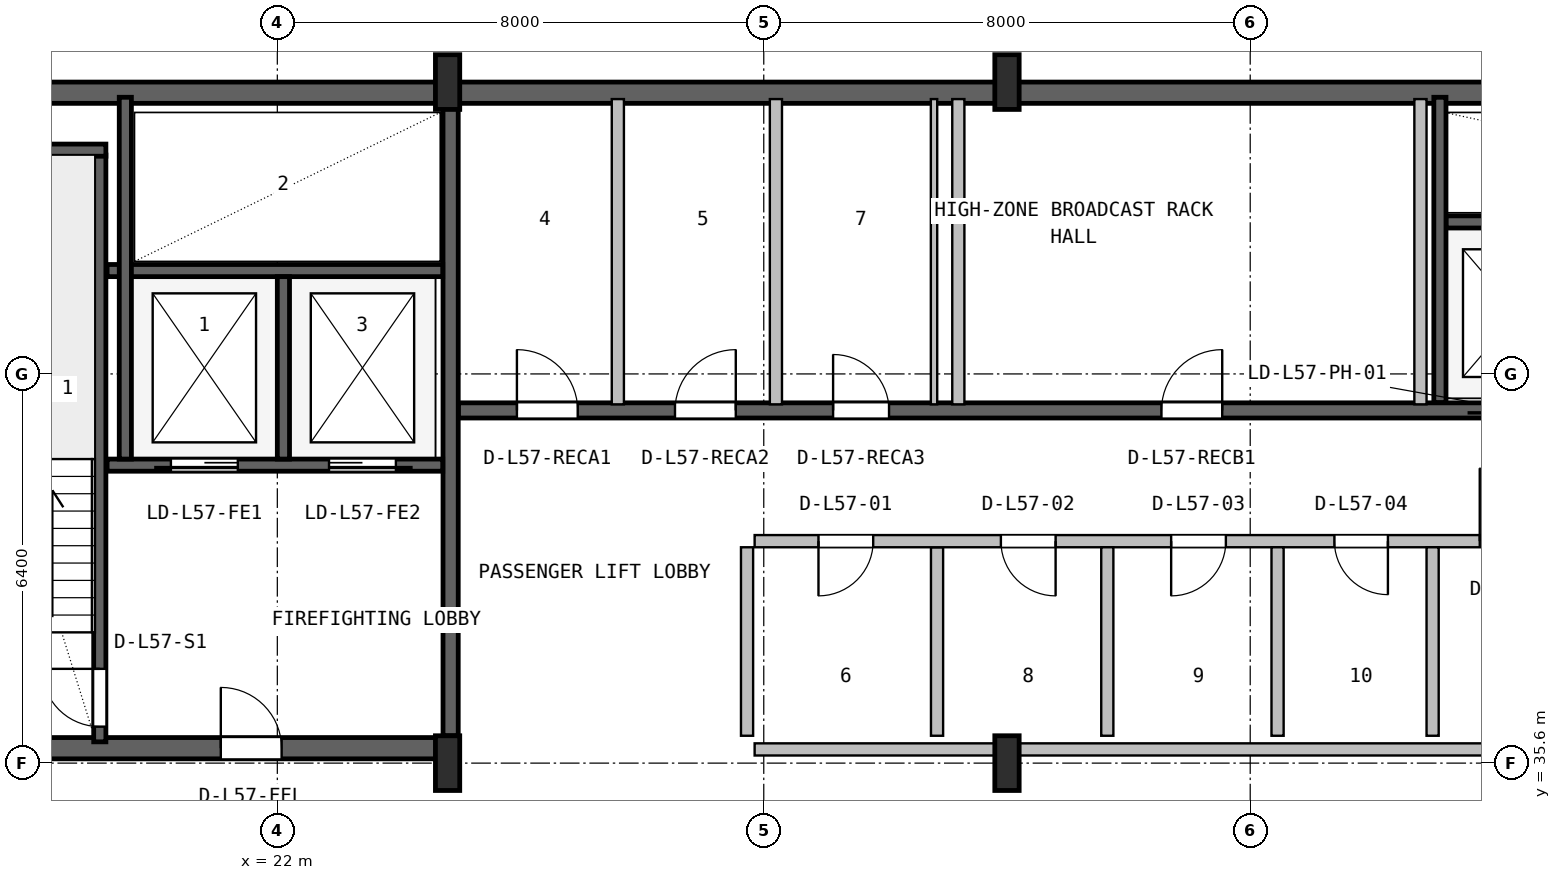
"""IFC4 building model, lengths in metres.
Left out: names, types, materials, properties, quantities, classifications, styles, units other than length and angle.
Written with IfcOpenShell. Run it as: python <this file> out.ifc"""

import sys

from ifc_helpers import new_model, si_unit, direction, frame, frame_2d, origin, origin_2d, place, context, subcontext, project, spatial, rectangle, i_section, extrude, source, transform, mapped, element, fill, save


model = new_model("IFC4")
c1 = context("Model", 3, precision=1e-05, world=origin(), true_north=direction((0.0, 1.0)))
c2 = subcontext(c1, "Body", "Model", "MODEL_VIEW")
j1 = project(units=[si_unit("LENGTHUNIT", "METRE"), si_unit("PLANEANGLEUNIT", "RADIAN")], contexts=[c1])
p1 = place(None, origin())
s1 = spatial("IfcSite", under=j1, at=p1, CompositionType="ELEMENT")
p2 = place(p1, origin())
s2 = spatial("IfcBuilding", under=s1, at=p2, CompositionType="ELEMENT")
p3 = place(p2, frame((0.0, 0.0, 230.2)))
s3 = spatial("IfcBuildingStorey", under=s2, at=p3, CompositionType="ELEMENT", Elevation=230.2)
p4 = place(p3, frame((15.6, 46.625, 0.0), z_axis=(0.0, 0.0, 1.0), x_axis=(1.0, 0.0, 0.0)))
e1 = element("IfcWall", 1, at=p4, inside=s3, PredefinedType="SHEAR", context=c2, shape_type="SweptSolid", body=[
    extrude(rectangle(XDim=36.8, YDim=0.35, at=frame_2d((18.4, 0.0))), origin(), (0.0, 0.0, 1.0), 3.48),
])
p5 = place(p3, frame((15.67, 35.845, 0.0), z_axis=(0.0, 0.0, 1.0), x_axis=(1.0, 0.0, 0.0)))
e2 = element("IfcWall", 2, at=p5, inside=s3, PredefinedType="SHEAR", context=c2, shape_type="SweptSolid", body=[
    extrude(rectangle(XDim=9.13, YDim=0.35, at=frame_2d((4.565, 0.0))), origin(), (0.0, 0.0, 1.0), 3.48),
])
p6 = place(p5, frame((5.4, 0.0, 0.0)))
e3 = element("IfcOpeningElement", 3, at=p6, cuts=e2, PredefinedType="OPENING", context=c2, shape_type="SweptSolid", body=[
    extrude(rectangle(XDim=1.0, YDim=2.1, at=frame_2d((0.5, 1.05))), frame((0.0, 0.185, 0.0), z_axis=(0.0, -1.0, 0.0), x_axis=(1.0, 0.0, 0.0)), (0.0, 0.0, 1.0), 0.37),
])
m1 = source(origin(), c2, "Body", "SweptSolid", [
    extrude(i_section(OverallWidth=0.4, OverallDepth=0.9, WebThickness=0.016, FlangeThickness=0.028, FilletRadius=0.016, at=origin_2d()), origin(), (0.0, 0.0, 1.0), 3.8),
])
for number, where, z_axis, x_axis in (
    (4, (24.8, 35.6, 0.0), (0.0, 0.0, 1.0), (1.0, 0.0, 0.0)),
    (5, (24.8, 46.8, 0.0), (0.0, 0.0, 1.0), (1.0, 0.0, 0.0)),
    (6, (34.0, 35.6, 0.0), (0.0, 0.0, 1.0), (1.0, 0.0, 0.0)),
    (7, (34.0, 46.8, 0.0), (0.0, 0.0, 1.0), (1.0, 0.0, 0.0)),
):
    element("IfcColumn", number, at=place(p3, frame(where, z_axis=z_axis, x_axis=x_axis)), inside=s3, PredefinedType="COLUMN", context=c2, shape_type="MappedRepresentation", body=[
        mapped(m1, transform((0.0, 0.0, 0.0), x_axis=(1.0, 0.0, 0.0), y_axis=(0.0, 1.0, 0.0), z_axis=(0.0, 0.0, 1.0), scale=1.0)),
    ])
p7 = place(p3, frame((19.08, 35.95, 0.0), z_axis=(0.0, 0.0, 1.0), x_axis=(0.0, 1.0, 0.0)))
e8 = element("IfcWall", 8, at=p7, inside=s3, PredefinedType="SHEAR", context=c2, shape_type="SweptSolid", body=[
    extrude(rectangle(XDim=9.65, YDim=0.2, at=frame_2d((4.825, 0.0))), origin(), (0.0, 0.0, 1.0), 3.48),
])
p8 = place(p7, frame((0.25, 0.0, 0.0)))
e9 = element("IfcOpeningElement", 9, at=p8, cuts=e8, PredefinedType="OPENING", context=c2, shape_type="SweptSolid", body=[
    extrude(rectangle(XDim=0.95, YDim=2.1, at=frame_2d((0.475, 1.05))), frame((0.0, 0.11, 0.0), z_axis=(0.0, -1.0, 0.0), x_axis=(1.0, 0.0, 0.0)), (0.0, 0.0, 1.0), 0.22),
])
p9 = place(p3, frame((15.95, 45.68, 0.0), z_axis=(0.0, 0.0, 1.0), x_axis=(1.0, 0.0, 0.0)))
e10 = element("IfcWall", 10, at=p9, inside=s3, PredefinedType="SHEAR", context=c2, shape_type="SweptSolid", body=[
    extrude(rectangle(XDim=3.23, YDim=0.2, at=frame_2d((1.615, 0.0))), origin(), (0.0, 0.0, 1.0), 3.48),
])
p10 = place(p3, frame((24.85, 36.05, 0.0), z_axis=(0.0, 0.0, 1.0), x_axis=(0.0, 1.0, 0.0)))
e11 = element("IfcWall", 11, at=p10, inside=s3, PredefinedType="SHEAR", context=c2, shape_type="SweptSolid", body=[
    extrude(rectangle(XDim=10.45, YDim=0.25, at=frame_2d((5.225, 0.0))), origin(), (0.0, 0.0, 1.0), 3.48),
])
p11 = place(p3, frame((19.2, 40.5, 0.0), z_axis=(0.0, 0.0, 1.0), x_axis=(1.0, 0.0, 0.0)))
e12 = element("IfcWall", 12, at=p11, inside=s3, PredefinedType="SHEAR", context=c2, shape_type="SweptSolid", body=[
    extrude(rectangle(XDim=5.52, YDim=0.2, at=frame_2d((2.76, 0.0))), origin(), (0.0, 0.0, 1.0), 3.48),
])
p12 = place(p11, frame((1.05, 0.0, 0.0)))
e13 = element("IfcOpeningElement", 13, at=p12, cuts=e12, PredefinedType="OPENING", context=c2, shape_type="SweptSolid", body=[
    extrude(rectangle(XDim=1.1, YDim=2.18, at=frame_2d((0.55, 1.09))), frame((0.0, 0.11, 0.0), z_axis=(0.0, -1.0, 0.0), x_axis=(1.0, 0.0, 0.0)), (0.0, 0.0, 1.0), 0.22),
])
p13 = place(p11, frame((3.65, 0.0, 0.0)))
e14 = element("IfcOpeningElement", 14, at=p13, cuts=e12, PredefinedType="OPENING", context=c2, shape_type="SweptSolid", body=[
    extrude(rectangle(XDim=1.1, YDim=2.18, at=frame_2d((0.55, 1.09))), frame((0.0, 0.11, 0.0), z_axis=(0.0, -1.0, 0.0), x_axis=(1.0, 0.0, 0.0)), (0.0, 0.0, 1.0), 0.22),
])
p14 = place(p3, frame((19.2, 43.7, 0.0), z_axis=(0.0, 0.0, 1.0), x_axis=(1.0, 0.0, 0.0)))
e15 = element("IfcWall", 15, at=p14, inside=s3, PredefinedType="SHEAR", context=c2, shape_type="SweptSolid", body=[
    extrude(rectangle(XDim=5.52, YDim=0.2, at=frame_2d((2.76, 0.0))), origin(), (0.0, 0.0, 1.0), 3.48),
])
p15 = place(p3, frame((22.1, 40.6, 0.0), z_axis=(0.0, 0.0, 1.0), x_axis=(0.0, 1.0, 0.0)))
e16 = element("IfcWall", 16, at=p15, inside=s3, PredefinedType="SHEAR", context=c2, shape_type="SweptSolid", body=[
    extrude(rectangle(XDim=3.0, YDim=0.2, at=frame_2d((1.5, 0.0))), origin(), (0.0, 0.0, 1.0), 3.48),
])
p16 = place(p3, frame((19.5, 40.6, 0.0), z_axis=(0.0, 0.0, 1.0), x_axis=(0.0, 1.0, 0.0)))
e17 = element("IfcWall", 17, at=p16, inside=s3, PredefinedType="SHEAR", context=c2, shape_type="SweptSolid", body=[
    extrude(rectangle(XDim=5.95, YDim=0.2, at=frame_2d((2.975, 0.0))), origin(), (0.0, 0.0, 1.0), 3.48),
])
p17 = place(p3, frame((24.98, 41.4, 0.0), z_axis=(0.0, 0.0, 1.0), x_axis=(1.0, 0.0, 0.0)))
e18 = element("IfcWall", 18, at=p17, inside=s3, PredefinedType="SHEAR", context=c2, shape_type="SweptSolid", body=[
    extrude(rectangle(XDim=23.82, YDim=0.25, at=frame_2d((11.91, 0.0))), origin(), (0.0, 0.0, 1.0), 3.48),
])
p18 = place(p17, frame((16.87, 0.0, 0.0)))
e19 = element("IfcOpeningElement", 19, at=p18, cuts=e18, PredefinedType="OPENING", context=c2, shape_type="SweptSolid", body=[
    extrude(rectangle(XDim=1.1, YDim=2.18, at=frame_2d((0.55, 1.09))), frame((0.0, 0.135, 0.0), z_axis=(0.0, -1.0, 0.0), x_axis=(1.0, 0.0, 0.0)), (0.0, 0.0, 1.0), 0.27),
])
p19 = place(p17, frame((19.47, 0.0, 0.0)))
e20 = element("IfcOpeningElement", 20, at=p19, cuts=e18, PredefinedType="OPENING", context=c2, shape_type="SweptSolid", body=[
    extrude(rectangle(XDim=1.1, YDim=2.18, at=frame_2d((0.55, 1.09))), frame((0.0, 0.135, 0.0), z_axis=(0.0, -1.0, 0.0), x_axis=(1.0, 0.0, 0.0)), (0.0, 0.0, 1.0), 0.27),
])
p20 = place(p17, frame((22.07, 0.0, 0.0)))
e21 = element("IfcOpeningElement", 21, at=p20, cuts=e18, PredefinedType="OPENING", context=c2, shape_type="SweptSolid", body=[
    extrude(rectangle(XDim=1.1, YDim=2.18, at=frame_2d((0.55, 1.09))), frame((0.0, 0.135, 0.0), z_axis=(0.0, -1.0, 0.0), x_axis=(1.0, 0.0, 0.0)), (0.0, 0.0, 1.0), 0.27),
])
p21 = place(p17, frame((0.96, 0.0, 0.0)))
e22 = element("IfcOpeningElement", 22, at=p21, cuts=e18, PredefinedType="OPENING", context=c2, shape_type="SweptSolid", body=[
    extrude(rectangle(XDim=1.0, YDim=2.08, at=frame_2d((0.5, 1.04))), frame((0.0, 0.135, 0.0), z_axis=(0.0, -1.0, 0.0), x_axis=(1.0, 0.0, 0.0)), (0.0, 0.0, 1.0), 0.27),
])
p22 = place(p17, frame((3.56, 0.0, 0.0)))
e23 = element("IfcOpeningElement", 23, at=p22, cuts=e18, PredefinedType="OPENING", context=c2, shape_type="SweptSolid", body=[
    extrude(rectangle(XDim=1.0, YDim=2.08, at=frame_2d((0.5, 1.04))), frame((0.0, 0.135, 0.0), z_axis=(0.0, -1.0, 0.0), x_axis=(1.0, 0.0, 0.0)), (0.0, 0.0, 1.0), 0.27),
])
p23 = place(p17, frame((6.16, 0.0, 0.0)))
e24 = element("IfcOpeningElement", 24, at=p23, cuts=e18, PredefinedType="OPENING", context=c2, shape_type="SweptSolid", body=[
    extrude(rectangle(XDim=0.92, YDim=2.08, at=frame_2d((0.46, 1.04))), frame((0.0, 0.135, 0.0), z_axis=(0.0, -1.0, 0.0), x_axis=(1.0, 0.0, 0.0)), (0.0, 0.0, 1.0), 0.27),
])
p24 = place(p17, frame((11.56, 0.0, 0.0)))
e25 = element("IfcOpeningElement", 25, at=p24, cuts=e18, PredefinedType="OPENING", context=c2, shape_type="SweptSolid", body=[
    extrude(rectangle(XDim=1.0, YDim=2.08, at=frame_2d((0.5, 1.04))), frame((0.0, 0.135, 0.0), z_axis=(0.0, -1.0, 0.0), x_axis=(1.0, 0.0, 0.0)), (0.0, 0.0, 1.0), 0.27),
])
p25 = place(p3, frame((41.22, 44.5, 0.0), z_axis=(0.0, 0.0, 1.0), x_axis=(1.0, 0.0, 0.0)))
e26 = element("IfcWall", 26, at=p25, inside=s3, PredefinedType="SHEAR", context=c2, shape_type="SweptSolid", body=[
    extrude(rectangle(XDim=7.58, YDim=0.2, at=frame_2d((3.79, 0.0))), origin(), (0.0, 0.0, 1.0), 3.48),
])
p26 = place(p3, frame((41.12, 41.53, 0.0), z_axis=(0.0, 0.0, 1.0), x_axis=(0.0, 1.0, 0.0)))
e27 = element("IfcWall", 27, at=p26, inside=s3, PredefinedType="SHEAR", context=c2, shape_type="SweptSolid", body=[
    extrude(rectangle(XDim=5.02, YDim=0.2, at=frame_2d((2.51, 0.0))), origin(), (0.0, 0.0, 1.0), 3.48),
])
p27 = place(p3, frame((29.85, 35.825, 0.0), z_axis=(0.0, 0.0, 1.0), x_axis=(1.0, 0.0, 0.0)))
e28 = element("IfcWall", 28, at=p27, inside=s3, PredefinedType="SOLIDWALL", context=c2, shape_type="SweptSolid", body=[
    extrude(rectangle(XDim=13.7, YDim=0.2, at=frame_2d((6.85, 0.0))), origin(), (0.0, 0.0, 1.0), 2.505),
])
p28 = place(p3, frame((32.85, 36.05, 0.0), z_axis=(0.0, 0.0, 1.0), x_axis=(0.0, 1.0, 0.0)))
e29 = element("IfcWall", 29, at=p28, inside=s3, PredefinedType="PLUMBINGWALL", context=c2, shape_type="SweptSolid", body=[
    extrude(rectangle(XDim=3.1, YDim=0.2, at=frame_2d((1.55, 0.0))), origin(), (0.0, 0.0, 1.0), 3.46),
])
p29 = place(p3, frame((29.85, 39.25, 0.0), z_axis=(0.0, 0.0, 1.0), x_axis=(1.0, 0.0, 0.0)))
e30 = element("IfcWall", 30, at=p29, inside=s3, PredefinedType="SOLIDWALL", context=c2, shape_type="SweptSolid", body=[
    extrude(rectangle(XDim=13.7, YDim=0.2, at=frame_2d((6.85, 0.0))), origin(), (0.0, 0.0, 1.0), 3.46),
])
p30 = place(p29, frame((1.05, 0.0, 0.0)))
e31 = element("IfcOpeningElement", 31, at=p30, cuts=e30, PredefinedType="OPENING", context=c2, shape_type="SweptSolid", body=[
    extrude(rectangle(XDim=0.9, YDim=2.06, at=frame_2d((0.45, 1.03))), frame((0.0, 0.11, 0.0), z_axis=(0.0, -1.0, 0.0), x_axis=(1.0, 0.0, 0.0)), (0.0, 0.0, 1.0), 0.22),
])
p31 = place(p29, frame((4.05, 0.0, 0.0)))
e32 = element("IfcOpeningElement", 32, at=p31, cuts=e30, PredefinedType="OPENING", context=c2, shape_type="SweptSolid", body=[
    extrude(rectangle(XDim=0.9, YDim=2.06, at=frame_2d((0.45, 1.03))), frame((0.0, 0.11, 0.0), z_axis=(0.0, -1.0, 0.0), x_axis=(1.0, 0.0, 0.0)), (0.0, 0.0, 1.0), 0.22),
])
p32 = place(p29, frame((6.85, 0.0, 0.0)))
e33 = element("IfcOpeningElement", 33, at=p32, cuts=e30, PredefinedType="OPENING", context=c2, shape_type="SweptSolid", body=[
    extrude(rectangle(XDim=0.9, YDim=2.06, at=frame_2d((0.45, 1.03))), frame((0.0, 0.11, 0.0), z_axis=(0.0, -1.0, 0.0), x_axis=(1.0, 0.0, 0.0)), (0.0, 0.0, 1.0), 0.22),
])
p33 = place(p29, frame((9.535, 0.0, 0.0)))
e34 = element("IfcOpeningElement", 34, at=p33, cuts=e30, PredefinedType="OPENING", context=c2, shape_type="SweptSolid", body=[
    extrude(rectangle(XDim=0.88, YDim=2.06, at=frame_2d((0.44, 1.03))), frame((0.0, 0.11, 0.0), z_axis=(0.0, -1.0, 0.0), x_axis=(1.0, 0.0, 0.0)), (0.0, 0.0, 1.0), 0.22),
])
p34 = place(p29, frame((11.925, 0.0, 0.0)))
e35 = element("IfcOpeningElement", 35, at=p34, cuts=e30, PredefinedType="OPENING", context=c2, shape_type="SweptSolid", body=[
    extrude(rectangle(XDim=1.2, YDim=2.1, at=frame_2d((0.6, 1.05))), frame((0.0, 0.11, 0.0), z_axis=(0.0, -1.0, 0.0), x_axis=(1.0, 0.0, 0.0)), (0.0, 0.0, 1.0), 0.22),
])
for number, where, z_axis, x_axis in (
    (36, (29.725, 36.05, 0.0), (0.0, 0.0, 1.0), (0.0, 1.0, 0.0)),
    (37, (35.65, 36.05, 0.0), (0.0, 0.0, 1.0), (0.0, 1.0, 0.0)),
    (38, (38.45, 36.05, 0.0), (0.0, 0.0, 1.0), (0.0, 1.0, 0.0)),
):
    element("IfcWall", number, at=place(p3, frame(where, z_axis=z_axis, x_axis=x_axis)), inside=s3, PredefinedType="PLUMBINGWALL", context=c2, shape_type="SweptSolid", body=[
        extrude(rectangle(XDim=3.1, YDim=0.2, at=frame_2d((1.55, 0.0))), origin(), (0.0, 0.0, 1.0), 3.46),
    ])
p35 = place(p3, frame((41.0, 36.05, 0.0), z_axis=(0.0, 0.0, 1.0), x_axis=(0.0, 1.0, 0.0)))
e39 = element("IfcWall", 39, at=p35, inside=s3, PredefinedType="SOLIDWALL", context=c2, shape_type="SweptSolid", body=[
    extrude(rectangle(XDim=3.1, YDim=0.2, at=frame_2d((1.55, 0.0))), origin(), (0.0, 0.0, 1.0), 3.46),
])
for number, where, z_axis, x_axis in (
    (40, (27.6, 41.5, 0.0), (0.0, 0.0, 1.0), (0.0, 1.0, 0.0)),
    (41, (30.2, 41.5, 0.0), (0.0, 0.0, 1.0), (0.0, 1.0, 0.0)),
):
    element("IfcWall", number, at=place(p3, frame(where, z_axis=z_axis, x_axis=x_axis)), inside=s3, PredefinedType="SOLIDWALL", context=c2, shape_type="SweptSolid", body=[
        extrude(rectangle(XDim=5.02, YDim=0.2, at=frame_2d((2.51, 0.0))), origin(), (0.0, 0.0, 1.0), 3.46),
    ])
p36 = place(p3, frame((32.8, 41.5, 0.0), z_axis=(0.0, 0.0, 1.0), x_axis=(0.0, 1.0, 0.0)))
e42 = element("IfcWall", 42, at=p36, inside=s3, PredefinedType="PARTITIONING", context=c2, shape_type="SweptSolid", body=[
    extrude(rectangle(XDim=5.02, YDim=0.105, at=frame_2d((2.51, 0.0))), origin(), (0.0, 0.0, 1.0), 3.46),
])
for number, where, z_axis, x_axis in (
    (43, (40.8, 41.5, 0.0), (0.0, 0.0, 1.0), (0.0, 1.0, 0.0)),
    (44, (33.2, 41.5, 0.0), (0.0, 0.0, 1.0), (0.0, 1.0, 0.0)),
):
    element("IfcWall", number, at=place(p3, frame(where, z_axis=z_axis, x_axis=x_axis)), inside=s3, PredefinedType="SOLIDWALL", context=c2, shape_type="SweptSolid", body=[
        extrude(rectangle(XDim=5.02, YDim=0.2, at=frame_2d((2.51, 0.0))), origin(), (0.0, 0.0, 1.0), 3.46),
    ])
m2 = source(origin(), c2, "Body", "SweptSolid", [
    extrude(rectangle(XDim=0.95, YDim=2.1, at=frame_2d((0.475, 1.05))), frame((0.0, 0.025, 0.0), z_axis=(0.0, -1.0, 0.0), x_axis=(1.0, 0.0, 0.0)), (0.0, 0.0, 1.0), 0.05),
])
p37 = place(p8, origin())
e45 = element("IfcDoor", 45, at=p37, inside=s3, OperationType="SINGLE_SWING_RIGHT", PredefinedType="DOOR", context=c2, shape_type="MappedRepresentation", body=[
    mapped(m2, transform((0.0, 0.0, 0.0), x_axis=(1.0, 0.0, 0.0), y_axis=(0.0, 1.0, 0.0), z_axis=(0.0, 0.0, 1.0), scale=1.0)),
])
fill(e9, e45)
m3 = source(origin(), c2, "Body", "SweptSolid", [
    extrude(rectangle(XDim=1.0, YDim=2.1, at=frame_2d((0.5, 1.05))), frame((0.0, 0.025, 0.0), z_axis=(0.0, -1.0, 0.0), x_axis=(1.0, 0.0, 0.0)), (0.0, 0.0, 1.0), 0.05),
])
p38 = place(p6, origin())
e46 = element("IfcDoor", 46, at=p38, inside=s3, OperationType="SINGLE_SWING_LEFT", PredefinedType="DOOR", context=c2, shape_type="MappedRepresentation", body=[
    mapped(m3, transform((0.0, 0.0, 0.0), x_axis=(1.0, 0.0, 0.0), y_axis=(0.0, 1.0, 0.0), z_axis=(0.0, 0.0, 1.0), scale=1.0)),
])
fill(e3, e46)
m4 = source(origin(), c2, "Body", "SweptSolid", [
    extrude(rectangle(XDim=1.1, YDim=2.18, at=frame_2d((0.55, 1.09))), frame((0.0, 0.025, 0.0), z_axis=(0.0, -1.0, 0.0), x_axis=(1.0, 0.0, 0.0)), (0.0, 0.0, 1.0), 0.05),
])
p39 = place(p12, frame((1.1, 0.0, 0.0), z_axis=(0.0, 0.0, 1.0), x_axis=(-1.0, 0.0, 0.0)))
e47 = element("IfcDoor", 47, at=p39, inside=s3, OperationType="SLIDING_TO_LEFT", PredefinedType="DOOR", context=c2, shape_type="MappedRepresentation", body=[
    mapped(m4, transform((0.0, 0.0, 0.0), x_axis=(1.0, 0.0, 0.0), y_axis=(0.0, 1.0, 0.0), z_axis=(0.0, 0.0, 1.0), scale=1.0)),
])
fill(e13, e47)
p40 = place(p13, frame((1.1, 0.0, 0.0), z_axis=(0.0, 0.0, 1.0), x_axis=(-1.0, 0.0, 0.0)))
e48 = element("IfcDoor", 48, at=p40, inside=s3, OperationType="SLIDING_TO_RIGHT", PredefinedType="DOOR", context=c2, shape_type="MappedRepresentation", body=[
    mapped(m4, transform((0.0, 0.0, 0.0), x_axis=(1.0, 0.0, 0.0), y_axis=(0.0, 1.0, 0.0), z_axis=(0.0, 0.0, 1.0), scale=1.0)),
])
fill(e14, e48)
m5 = source(origin(), c2, "Body", "SweptSolid", [
    extrude(rectangle(XDim=1.0, YDim=2.08, at=frame_2d((0.5, 1.04))), frame((0.0, 0.025, 0.0), z_axis=(0.0, -1.0, 0.0), x_axis=(1.0, 0.0, 0.0)), (0.0, 0.0, 1.0), 0.05),
])
p41 = place(p21, origin())
e49 = element("IfcDoor", 49, at=p41, inside=s3, OperationType="SINGLE_SWING_LEFT", PredefinedType="DOOR", context=c2, shape_type="MappedRepresentation", body=[
    mapped(m5, transform((0.0, 0.0, 0.0), x_axis=(1.0, 0.0, 0.0), y_axis=(0.0, 1.0, 0.0), z_axis=(0.0, 0.0, 1.0), scale=1.0)),
])
fill(e22, e49)
p42 = place(p22, origin())
e50 = element("IfcDoor", 50, at=p42, inside=s3, OperationType="SINGLE_SWING_RIGHT", PredefinedType="DOOR", context=c2, shape_type="MappedRepresentation", body=[
    mapped(m5, transform((0.0, 0.0, 0.0), x_axis=(1.0, 0.0, 0.0), y_axis=(0.0, 1.0, 0.0), z_axis=(0.0, 0.0, 1.0), scale=1.0)),
])
fill(e23, e50)
m6 = source(origin(), c2, "Body", "SweptSolid", [
    extrude(rectangle(XDim=0.92, YDim=2.08, at=frame_2d((0.46, 1.04))), frame((0.0, 0.025, 0.0), z_axis=(0.0, -1.0, 0.0), x_axis=(1.0, 0.0, 0.0)), (0.0, 0.0, 1.0), 0.05),
])
p43 = place(p23, origin())
e51 = element("IfcDoor", 51, at=p43, inside=s3, OperationType="SINGLE_SWING_LEFT", PredefinedType="DOOR", context=c2, shape_type="MappedRepresentation", body=[
    mapped(m6, transform((0.0, 0.0, 0.0), x_axis=(1.0, 0.0, 0.0), y_axis=(0.0, 1.0, 0.0), z_axis=(0.0, 0.0, 1.0), scale=1.0)),
])
fill(e24, e51)
p44 = place(p24, origin())
e52 = element("IfcDoor", 52, at=p44, inside=s3, OperationType="SINGLE_SWING_RIGHT", PredefinedType="DOOR", context=c2, shape_type="MappedRepresentation", body=[
    mapped(m5, transform((0.0, 0.0, 0.0), x_axis=(1.0, 0.0, 0.0), y_axis=(0.0, 1.0, 0.0), z_axis=(0.0, 0.0, 1.0), scale=1.0)),
])
fill(e25, e52)
m7 = source(origin(), c2, "Body", "SweptSolid", [
    extrude(rectangle(XDim=0.9, YDim=2.06, at=frame_2d((0.45, 1.03))), frame((0.0, 0.025, 0.0), z_axis=(0.0, -1.0, 0.0), x_axis=(1.0, 0.0, 0.0)), (0.0, 0.0, 1.0), 0.05),
])
p45 = place(p30, frame((0.9, 0.0, 0.0), z_axis=(0.0, 0.0, 1.0), x_axis=(-1.0, 0.0, 0.0)))
e53 = element("IfcDoor", 53, at=p45, inside=s3, OperationType="SINGLE_SWING_LEFT", PredefinedType="DOOR", context=c2, shape_type="MappedRepresentation", body=[
    mapped(m7, transform((0.0, 0.0, 0.0), x_axis=(1.0, 0.0, 0.0), y_axis=(0.0, 1.0, 0.0), z_axis=(0.0, 0.0, 1.0), scale=1.0)),
])
fill(e31, e53)
p46 = place(p31, frame((0.9, 0.0, 0.0), z_axis=(0.0, 0.0, 1.0), x_axis=(-1.0, 0.0, 0.0)))
e54 = element("IfcDoor", 54, at=p46, inside=s3, OperationType="SINGLE_SWING_RIGHT", PredefinedType="DOOR", context=c2, shape_type="MappedRepresentation", body=[
    mapped(m7, transform((0.0, 0.0, 0.0), x_axis=(1.0, 0.0, 0.0), y_axis=(0.0, 1.0, 0.0), z_axis=(0.0, 0.0, 1.0), scale=1.0)),
])
fill(e32, e54)
p47 = place(p32, frame((0.9, 0.0, 0.0), z_axis=(0.0, 0.0, 1.0), x_axis=(-1.0, 0.0, 0.0)))
e55 = element("IfcDoor", 55, at=p47, inside=s3, OperationType="SINGLE_SWING_LEFT", PredefinedType="DOOR", context=c2, shape_type="MappedRepresentation", body=[
    mapped(m7, transform((0.0, 0.0, 0.0), x_axis=(1.0, 0.0, 0.0), y_axis=(0.0, 1.0, 0.0), z_axis=(0.0, 0.0, 1.0), scale=1.0)),
])
fill(e33, e55)
m8 = source(origin(), c2, "Body", "SweptSolid", [
    extrude(rectangle(XDim=0.88, YDim=2.06, at=frame_2d((0.44, 1.03))), frame((0.0, 0.025, 0.0), z_axis=(0.0, -1.0, 0.0), x_axis=(1.0, 0.0, 0.0)), (0.0, 0.0, 1.0), 0.05),
])
p48 = place(p33, frame((0.88, 0.0, 0.0), z_axis=(0.0, 0.0, 1.0), x_axis=(-1.0, 0.0, 0.0)))
e56 = element("IfcDoor", 56, at=p48, inside=s3, OperationType="SINGLE_SWING_RIGHT", PredefinedType="DOOR", context=c2, shape_type="MappedRepresentation", body=[
    mapped(m8, transform((0.0, 0.0, 0.0), x_axis=(1.0, 0.0, 0.0), y_axis=(0.0, 1.0, 0.0), z_axis=(0.0, 0.0, 1.0), scale=1.0)),
])
fill(e34, e56)
m9 = source(origin(), c2, "Body", "SweptSolid", [
    extrude(rectangle(XDim=1.2, YDim=2.1, at=frame_2d((0.6, 1.05))), frame((0.0, 0.025, 0.0), z_axis=(0.0, -1.0, 0.0), x_axis=(1.0, 0.0, 0.0)), (0.0, 0.0, 1.0), 0.05),
])
p49 = place(p34, origin())
e57 = element("IfcDoor", 57, at=p49, inside=s3, OperationType="SINGLE_SWING_LEFT", PredefinedType="DOOR", context=c2, shape_type="MappedRepresentation", body=[
    mapped(m9, transform((0.0, 0.0, 0.0), x_axis=(1.0, 0.0, 0.0), y_axis=(0.0, 1.0, 0.0), z_axis=(0.0, 0.0, 1.0), scale=1.0)),
])
fill(e35, e57)
save(model, sys.argv[1])
